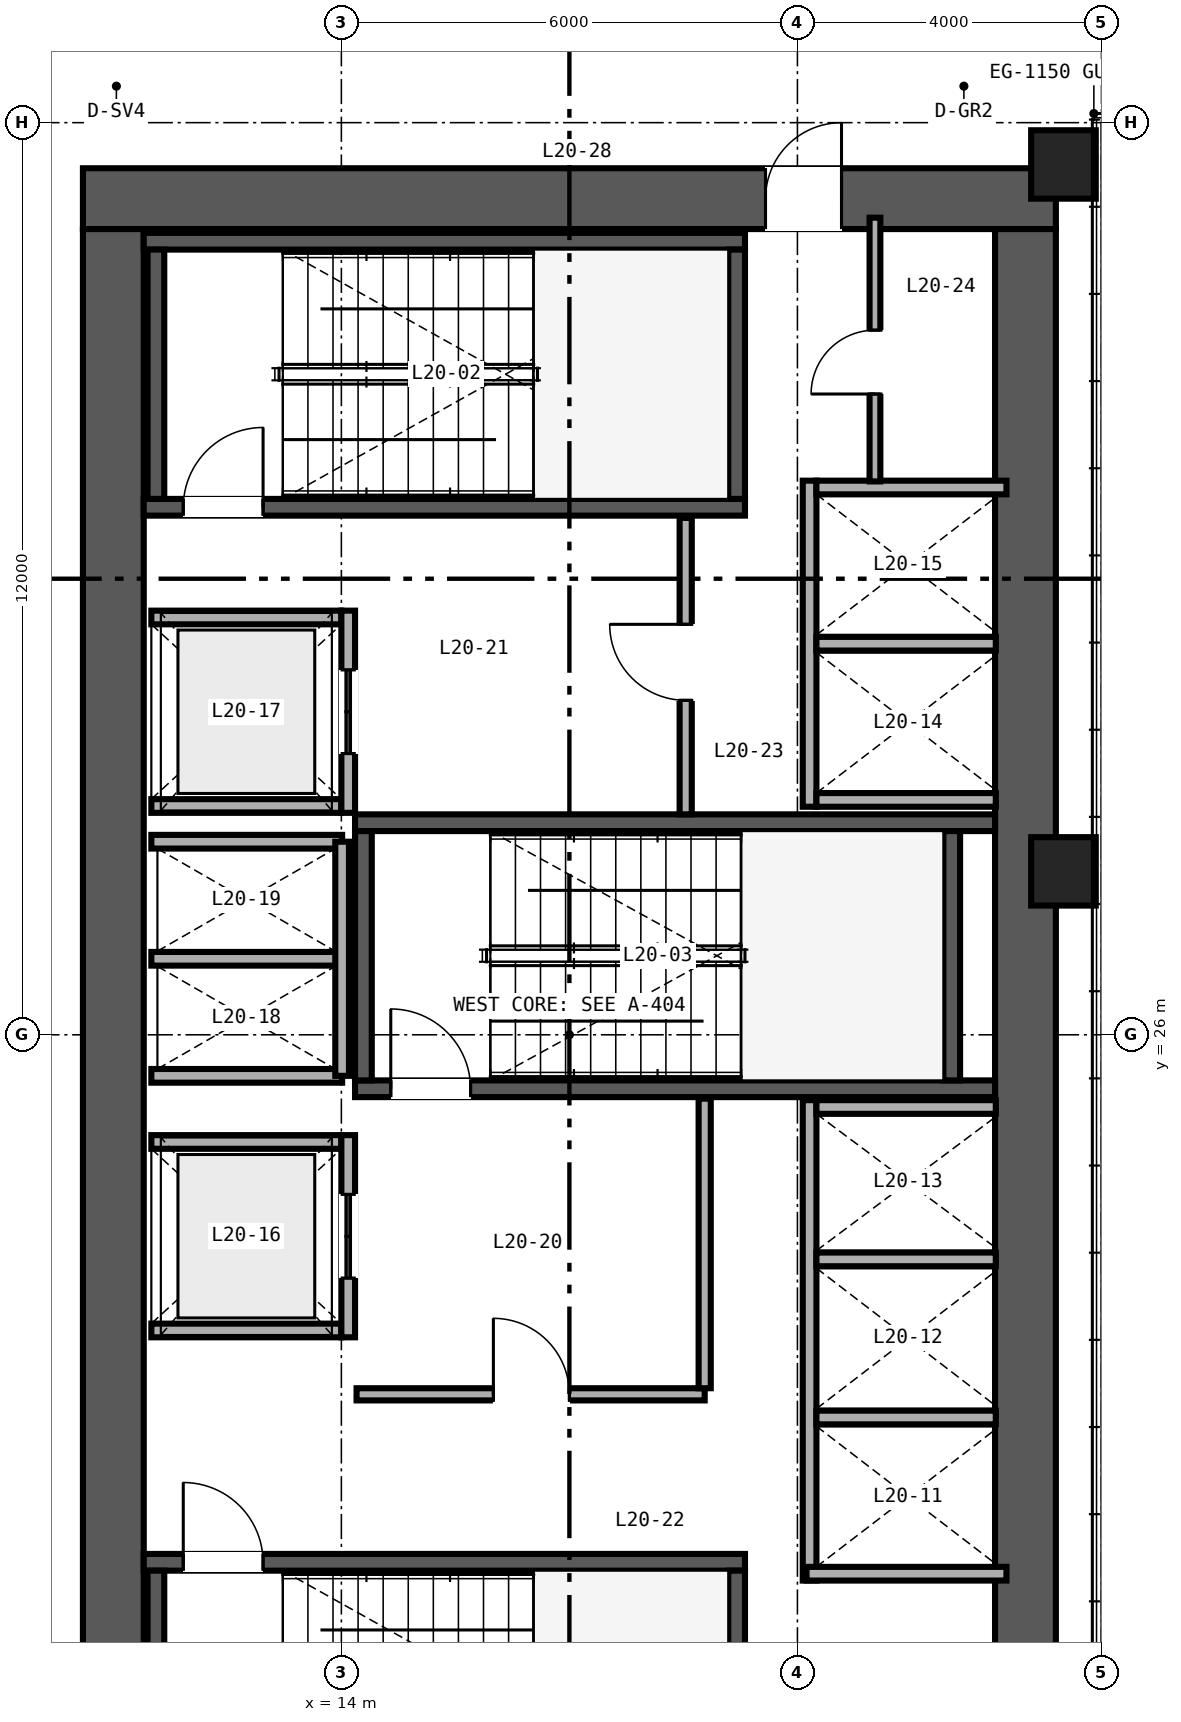
"""IFC4 building model, lengths in metres.
Left out: names, types, materials, properties, quantities, classifications, styles, units other than length and angle.
Written with IfcOpenShell. Run it as: python <this file> out.ifc"""

import sys

from ifc_helpers import new_model, si_unit, direction, frame, frame_2d, origin, origin_2d, place, context, subcontext, project, spatial, rectangle, hollow_rectangle, extrude, source, transform, mapped, element, fill, save


model = new_model("IFC4")
c1 = context("Model", 3, precision=1e-05, world=origin(), true_north=direction((0.0, 1.0)))
c2 = subcontext(c1, "Body", "Model", "MODEL_VIEW")
j1 = project(units=[si_unit("LENGTHUNIT", "METRE"), si_unit("PLANEANGLEUNIT", "RADIAN")], contexts=[c1])
p1 = place(None, origin())
s1 = spatial("IfcSite", under=j1, at=p1, CompositionType="ELEMENT")
p2 = place(p1, origin())
s2 = spatial("IfcBuilding", under=s1, at=p2, CompositionType="ELEMENT")
p3 = place(p2, frame((0.0, 0.0, 81.6)))
s3 = spatial("IfcBuildingStorey", under=s2, at=p3, CompositionType="ELEMENT", Elevation=81.6)
p4 = place(p3, frame((10.6, 37.0, 0.0), z_axis=(0.0, 0.0, 1.0), x_axis=(1.0, 0.0, 0.0)))
e1 = element("IfcWall", 1, at=p4, inside=s3, PredefinedType="SHEAR", context=c2, shape_type="SweptSolid", body=[
    extrude(rectangle(XDim=12.8, YDim=0.8, at=frame_2d((6.4, 0.0))), origin(), (0.0, 0.0, 1.0), 3.28),
])
p5 = place(p4, frame((8.98, 0.0, 0.0)))
e2 = element("IfcOpeningElement", 2, at=p5, cuts=e1, PredefinedType="OPENING", context=c2, shape_type="SweptSolid", body=[
    extrude(rectangle(XDim=1.0, YDim=2.15, at=frame_2d((0.5, 1.075))), frame((0.0, 0.41, 0.0), z_axis=(0.0, -1.0, 0.0), x_axis=(1.0, 0.0, 0.0)), (0.0, 0.0, 1.0), 0.82),
])
for number, where, z_axis, x_axis in (
    (3, (11.0, 15.4, 0.0), (0.0, 0.0, 1.0), (0.0, 1.0, 0.0)),
    (4, (23.0, 15.4, 0.0), (0.0, 0.0, 1.0), (0.0, 1.0, 0.0)),
):
    element("IfcWall", number, at=place(p3, frame(where, z_axis=z_axis, x_axis=x_axis)), inside=s3, PredefinedType="SHEAR", context=c2, shape_type="SweptSolid", body=[
        extrude(rectangle(XDim=21.2, YDim=0.8, at=frame_2d((10.6, 0.0))), origin(), (0.0, 0.0, 1.0), 3.28),
    ])
p6 = place(p3, frame((11.4, 19.06, 0.0), z_axis=(0.0, 0.0, 1.0), x_axis=(1.0, 0.0, 0.0)))
e5 = element("IfcWall", 5, at=p6, inside=s3, PredefinedType="SHEAR", context=c2, shape_type="SweptSolid", body=[
    extrude(rectangle(XDim=7.91, YDim=0.22, at=frame_2d((3.955, 0.0))), origin(), (0.0, 0.0, 1.0), 3.4),
])
p7 = place(p6, frame((0.52, 0.0, 0.0)))
e6 = element("IfcOpeningElement", 6, at=p7, cuts=e5, PredefinedType="OPENING", context=c2, shape_type="SweptSolid", body=[
    extrude(rectangle(XDim=1.05, YDim=2.15, at=frame_2d((0.525, 1.075))), frame((0.0, 0.12, 0.0), z_axis=(0.0, -1.0, 0.0), x_axis=(1.0, 0.0, 0.0)), (0.0, 0.0, 1.0), 0.24),
])
for number, where, z_axis, x_axis in (
    (7, (11.56, 15.67, 0.0), (0.0, 0.0, 1.0), (0.0, 1.0, 0.0)),
    (8, (19.2, 15.67, 0.0), (0.0, 0.0, 1.0), (0.0, 1.0, 0.0)),
):
    element("IfcWall", number, at=place(p3, frame(where, z_axis=z_axis, x_axis=x_axis)), inside=s3, PredefinedType="SHEAR", context=c2, shape_type="SweptSolid", body=[
        extrude(rectangle(XDim=3.28, YDim=0.22, at=frame_2d((1.64, 0.0))), origin(), (0.0, 0.0, 1.0), 3.4),
    ])
p8 = place(p3, frame((11.4, 32.94, 0.0), z_axis=(0.0, 0.0, 1.0), x_axis=(1.0, 0.0, 0.0)))
e9 = element("IfcWall", 9, at=p8, inside=s3, PredefinedType="SHEAR", context=c2, shape_type="SweptSolid", body=[
    extrude(rectangle(XDim=7.91, YDim=0.22, at=frame_2d((3.955, 0.0))), origin(), (0.0, 0.0, 1.0), 3.4),
])
p9 = place(p8, frame((0.52, 0.0, 0.0)))
e10 = element("IfcOpeningElement", 10, at=p9, cuts=e9, PredefinedType="OPENING", context=c2, shape_type="SweptSolid", body=[
    extrude(rectangle(XDim=1.05, YDim=2.15, at=frame_2d((0.525, 1.075))), frame((0.0, 0.12, 0.0), z_axis=(0.0, -1.0, 0.0), x_axis=(1.0, 0.0, 0.0)), (0.0, 0.0, 1.0), 0.24),
])
p10 = place(p3, frame((11.4, 36.44, 0.0), z_axis=(0.0, 0.0, 1.0), x_axis=(1.0, 0.0, 0.0)))
e11 = element("IfcWall", 11, at=p10, inside=s3, PredefinedType="SHEAR", context=c2, shape_type="SweptSolid", body=[
    extrude(rectangle(XDim=7.91, YDim=0.22, at=frame_2d((3.955, 0.0))), origin(), (0.0, 0.0, 1.0), 3.4),
])
for number, where, z_axis, x_axis in (
    (12, (11.56, 33.05, 0.0), (0.0, 0.0, 1.0), (0.0, 1.0, 0.0)),
    (13, (19.2, 33.05, 0.0), (0.0, 0.0, 1.0), (0.0, 1.0, 0.0)),
):
    element("IfcWall", number, at=place(p3, frame(where, z_axis=z_axis, x_axis=x_axis)), inside=s3, PredefinedType="SHEAR", context=c2, shape_type="SweptSolid", body=[
        extrude(rectangle(XDim=3.28, YDim=0.22, at=frame_2d((1.64, 0.0))), origin(), (0.0, 0.0, 1.0), 3.4),
    ])
p11 = place(p3, frame((14.18, 25.29, 0.0), z_axis=(0.0, 0.0, 1.0), x_axis=(1.0, 0.0, 0.0)))
e14 = element("IfcWall", 14, at=p11, inside=s3, PredefinedType="SHEAR", context=c2, shape_type="SweptSolid", body=[
    extrude(rectangle(XDim=8.42, YDim=0.22, at=frame_2d((4.21, 0.0))), origin(), (0.0, 0.0, 1.0), 3.4),
])
p12 = place(p11, frame((0.47, 0.0, 0.0)))
e15 = element("IfcOpeningElement", 15, at=p12, cuts=e14, PredefinedType="OPENING", context=c2, shape_type="SweptSolid", body=[
    extrude(rectangle(XDim=1.05, YDim=2.15, at=frame_2d((0.525, 1.075))), frame((0.0, 0.12, 0.0), z_axis=(0.0, -1.0, 0.0), x_axis=(1.0, 0.0, 0.0)), (0.0, 0.0, 1.0), 0.24),
])
p13 = place(p3, frame((14.18, 28.79, 0.0), z_axis=(0.0, 0.0, 1.0), x_axis=(1.0, 0.0, 0.0)))
e16 = element("IfcWall", 16, at=p13, inside=s3, PredefinedType="SHEAR", context=c2, shape_type="SweptSolid", body=[
    extrude(rectangle(XDim=8.42, YDim=0.22, at=frame_2d((4.21, 0.0))), origin(), (0.0, 0.0, 1.0), 3.4),
])
for number, where, z_axis, x_axis in (
    (17, (14.29, 25.4, 0.0), (0.0, 0.0, 1.0), (0.0, 1.0, 0.0)),
    (18, (22.03, 25.4, 0.0), (0.0, 0.0, 1.0), (0.0, 1.0, 0.0)),
):
    element("IfcWall", number, at=place(p3, frame(where, z_axis=z_axis, x_axis=x_axis)), inside=s3, PredefinedType="SHEAR", context=c2, shape_type="SweptSolid", body=[
        extrude(rectangle(XDim=3.28, YDim=0.22, at=frame_2d((1.64, 0.0))), origin(), (0.0, 0.0, 1.0), 3.4),
    ])
m1 = source(origin(), c2, "Body", "SweptSolid", [
    extrude(hollow_rectangle(XDim=0.85, YDim=0.9, WallThickness=0.04, at=origin_2d()), origin(), (0.0, 0.0, 1.0), 3.28),
])
for number, where, z_axis, x_axis in (
    (19, (23.5, 28.15, 0.0), (0.0, 0.0, 1.0), (1.0, 0.0, 0.0)),
    (20, (23.5, 37.45, 0.0), (0.0, 0.0, 1.0), (1.0, 0.0, 0.0)),
):
    element("IfcColumn", number, at=place(p3, frame(where, z_axis=z_axis, x_axis=x_axis)), inside=s3, PredefinedType="COLUMN", context=c2, shape_type="MappedRepresentation", body=[
        mapped(m1, transform((0.0, 0.0, 0.0), scale=1.0)),
    ])
p14 = place(p3, frame((20.16, 18.82, 0.0), z_axis=(0.0, 0.0, 1.0), x_axis=(0.0, 1.0, 0.0)))
e21 = element("IfcWall", 21, at=p14, inside=s3, PredefinedType="SOLIDWALL", context=c2, shape_type="SweptSolid", body=[
    extrude(rectangle(XDim=6.32, YDim=0.18, at=frame_2d((3.16, 0.0))), origin(), (0.0, 0.0, 1.0), 2.36),
])
p15 = place(p3, frame((20.12, 18.91, 0.0), z_axis=(0.0, 0.0, 1.0), x_axis=(1.0, 0.0, 0.0)))
e22 = element("IfcWall", 22, at=p15, inside=s3, PredefinedType="SOLIDWALL", context=c2, shape_type="SweptSolid", body=[
    extrude(rectangle(XDim=2.63, YDim=0.18, at=frame_2d((1.315, 0.0))), origin(), (0.0, 0.0, 1.0), 3.28),
])
p16 = place(p3, frame((20.25, 25.05, 0.0), z_axis=(0.0, 0.0, 1.0), x_axis=(1.0, 0.0, 0.0)))
e23 = element("IfcWall", 23, at=p16, inside=s3, PredefinedType="SOLIDWALL", context=c2, shape_type="SweptSolid", body=[
    extrude(rectangle(XDim=2.36, YDim=0.18, at=frame_2d((1.18, 0.0))), origin(), (0.0, 0.0, 1.0), 3.28),
])
p17 = place(p3, frame((20.25, 20.965, 0.0), z_axis=(0.0, 0.0, 1.0), x_axis=(1.0, 0.0, 0.0)))
e24 = element("IfcWall", 24, at=p17, inside=s3, PredefinedType="SOLIDWALL", context=c2, shape_type="SweptSolid", body=[
    extrude(rectangle(XDim=2.36, YDim=0.18, at=frame_2d((1.18, 0.0))), origin(), (0.0, 0.0, 1.0), 2.36),
])
p18 = place(p3, frame((20.25, 23.045, 0.0), z_axis=(0.0, 0.0, 1.0), x_axis=(1.0, 0.0, 0.0)))
e25 = element("IfcWall", 25, at=p18, inside=s3, PredefinedType="SOLIDWALL", context=c2, shape_type="SweptSolid", body=[
    extrude(rectangle(XDim=2.36, YDim=0.18, at=frame_2d((1.18, 0.0))), origin(), (0.0, 0.0, 1.0), 3.28),
])
p19 = place(p3, frame((20.16, 29.0, 0.0), z_axis=(0.0, 0.0, 1.0), x_axis=(0.0, 1.0, 0.0)))
e26 = element("IfcWall", 26, at=p19, inside=s3, PredefinedType="SOLIDWALL", context=c2, shape_type="SweptSolid", body=[
    extrude(rectangle(XDim=4.29, YDim=0.18, at=frame_2d((2.145, 0.0))), origin(), (0.0, 0.0, 1.0), 3.28),
])
p20 = place(p3, frame((20.25, 29.09, 0.0), z_axis=(0.0, 0.0, 1.0), x_axis=(1.0, 0.0, 0.0)))
e27 = element("IfcWall", 27, at=p20, inside=s3, PredefinedType="SOLIDWALL", context=c2, shape_type="SweptSolid", body=[
    extrude(rectangle(XDim=2.36, YDim=0.18, at=frame_2d((1.18, 0.0))), origin(), (0.0, 0.0, 1.0), 3.28),
])
p21 = place(p3, frame((20.25, 33.2, 0.0), z_axis=(0.0, 0.0, 1.0), x_axis=(1.0, 0.0, 0.0)))
e28 = element("IfcWall", 28, at=p21, inside=s3, PredefinedType="SOLIDWALL", context=c2, shape_type="SweptSolid", body=[
    extrude(rectangle(XDim=2.5, YDim=0.18, at=frame_2d((1.25, 0.0))), origin(), (0.0, 0.0, 1.0), 3.28),
])
p22 = place(p3, frame((20.25, 31.145, 0.0), z_axis=(0.0, 0.0, 1.0), x_axis=(1.0, 0.0, 0.0)))
e29 = element("IfcWall", 29, at=p22, inside=s3, PredefinedType="SOLIDWALL", context=c2, shape_type="SweptSolid", body=[
    extrude(rectangle(XDim=2.36, YDim=0.18, at=frame_2d((1.18, 0.0))), origin(), (0.0, 0.0, 1.0), 3.28),
])
for number, where, z_axis, x_axis in (
    (30, (11.5, 22.11, 0.0), (0.0, 0.0, 1.0), (1.0, 0.0, 0.0)),
    (31, (11.5, 24.59, 0.0), (0.0, 0.0, 1.0), (1.0, 0.0, 0.0)),
):
    element("IfcWall", number, at=place(p3, frame(where, z_axis=z_axis, x_axis=x_axis)), inside=s3, PredefinedType="SOLIDWALL", context=c2, shape_type="SweptSolid", body=[
        extrude(rectangle(XDim=2.5, YDim=0.18, at=frame_2d((1.25, 0.0))), origin(), (0.0, 0.0, 1.0), 3.28),
    ])
p23 = place(p3, frame((14.09, 22.02, 0.0), z_axis=(0.0, 0.0, 1.0), x_axis=(0.0, 1.0, 0.0)))
e32 = element("IfcWall", 32, at=p23, inside=s3, PredefinedType="SOLIDWALL", context=c2, shape_type="SweptSolid", body=[
    extrude(rectangle(XDim=2.66, YDim=0.18, at=frame_2d((1.33, 0.0))), origin(), (0.0, 0.0, 1.0), 3.28),
])
p24 = place(p23, frame((0.78, 0.0, 0.0)))
e33 = element("IfcOpeningElement", 33, at=p24, cuts=e32, PredefinedType="OPENING", context=c2, shape_type="SweptSolid", body=[
    extrude(rectangle(XDim=1.1, YDim=2.2, at=frame_2d((0.55, 1.1))), frame((0.0, 0.1, 0.0), z_axis=(0.0, -1.0, 0.0), x_axis=(1.0, 0.0, 0.0)), (0.0, 0.0, 1.0), 0.2),
])
for number, where, z_axis, x_axis in (
    (34, (11.5, 29.01, 0.0), (0.0, 0.0, 1.0), (1.0, 0.0, 0.0)),
    (35, (11.5, 31.49, 0.0), (0.0, 0.0, 1.0), (1.0, 0.0, 0.0)),
):
    element("IfcWall", number, at=place(p3, frame(where, z_axis=z_axis, x_axis=x_axis)), inside=s3, PredefinedType="SOLIDWALL", context=c2, shape_type="SweptSolid", body=[
        extrude(rectangle(XDim=2.5, YDim=0.18, at=frame_2d((1.25, 0.0))), origin(), (0.0, 0.0, 1.0), 3.28),
    ])
p25 = place(p3, frame((14.09, 28.92, 0.0), z_axis=(0.0, 0.0, 1.0), x_axis=(0.0, 1.0, 0.0)))
e36 = element("IfcWall", 36, at=p25, inside=s3, PredefinedType="SOLIDWALL", context=c2, shape_type="SweptSolid", body=[
    extrude(rectangle(XDim=2.66, YDim=0.18, at=frame_2d((1.33, 0.0))), origin(), (0.0, 0.0, 1.0), 3.28),
])
p26 = place(p25, frame((0.78, 0.0, 0.0)))
e37 = element("IfcOpeningElement", 37, at=p26, cuts=e36, PredefinedType="OPENING", context=c2, shape_type="SweptSolid", body=[
    extrude(rectangle(XDim=1.1, YDim=2.2, at=frame_2d((0.55, 1.1))), frame((0.0, 0.1, 0.0), z_axis=(0.0, -1.0, 0.0), x_axis=(1.0, 0.0, 0.0)), (0.0, 0.0, 1.0), 0.2),
])
for number, where, z_axis, x_axis in (
    (38, (11.5, 25.46, 0.0), (0.0, 0.0, 1.0), (1.0, 0.0, 0.0)),
    (39, (11.5, 27.0, 0.0), (0.0, 0.0, 1.0), (1.0, 0.0, 0.0)),
    (40, (11.5, 28.54, 0.0), (0.0, 0.0, 1.0), (1.0, 0.0, 0.0)),
):
    element("IfcWall", number, at=place(p3, frame(where, z_axis=z_axis, x_axis=x_axis)), inside=s3, PredefinedType="SOLIDWALL", context=c2, shape_type="SweptSolid", body=[
        extrude(rectangle(XDim=2.51, YDim=0.18, at=frame_2d((1.255, 0.0))), origin(), (0.0, 0.0, 1.0), 3.28),
    ])
p27 = place(p3, frame((14.01, 25.46, 0.0), z_axis=(0.0, 0.0, 1.0), x_axis=(0.0, 1.0, 0.0)))
e41 = element("IfcWall", 41, at=p27, inside=s3, PredefinedType="SOLIDWALL", context=c2, shape_type="SweptSolid", body=[
    extrude(rectangle(XDim=3.08, YDim=0.18, at=frame_2d((1.54, 0.0))), origin(), (0.0, 0.0, 1.0), 3.28),
])
p28 = place(p3, frame((14.2, 21.27, 0.0), z_axis=(0.0, 0.0, 1.0), x_axis=(1.0, 0.0, 0.0)))
e42 = element("IfcWall", 42, at=p28, inside=s3, PredefinedType="PARTITIONING", context=c2, shape_type="SweptSolid", body=[
    extrude(rectangle(XDim=4.58, YDim=0.16, at=frame_2d((2.29, 0.0))), origin(), (0.0, 0.0, 1.0), 3.28),
])
p29 = place(p28, frame((1.8, 0.0, 0.0)))
e43 = element("IfcOpeningElement", 43, at=p29, cuts=e42, PredefinedType="OPENING", context=c2, shape_type="SweptSolid", body=[
    extrude(rectangle(XDim=1.0, YDim=2.15, at=frame_2d((0.5, 1.075))), frame((0.0, 0.09, 0.0), z_axis=(0.0, -1.0, 0.0), x_axis=(1.0, 0.0, 0.0)), (0.0, 0.0, 1.0), 0.18),
])
p30 = place(p3, frame((18.78, 21.35, 0.0), z_axis=(0.0, 0.0, 1.0), x_axis=(0.0, 1.0, 0.0)))
e44 = element("IfcWall", 44, at=p30, inside=s3, PredefinedType="PARTITIONING", context=c2, shape_type="SweptSolid", body=[
    extrude(rectangle(XDim=3.81, YDim=0.16, at=frame_2d((1.905, 0.0))), origin(), (0.0, 0.0, 1.0), 3.28),
])
p31 = place(p3, frame((18.53, 28.9, 0.0), z_axis=(0.0, 0.0, 1.0), x_axis=(0.0, 1.0, 0.0)))
e45 = element("IfcWall", 45, at=p31, inside=s3, PredefinedType="PARTITIONING", context=c2, shape_type="SweptSolid", body=[
    extrude(rectangle(XDim=3.9, YDim=0.16, at=frame_2d((1.95, 0.0))), origin(), (0.0, 0.0, 1.0), 3.28),
])
p32 = place(p31, frame((1.5, 0.0, 0.0)))
e46 = element("IfcOpeningElement", 46, at=p32, cuts=e45, PredefinedType="OPENING", context=c2, shape_type="SweptSolid", body=[
    extrude(rectangle(XDim=1.0, YDim=2.15, at=frame_2d((0.5, 1.075))), frame((0.0, 0.09, 0.0), z_axis=(0.0, -1.0, 0.0), x_axis=(1.0, 0.0, 0.0)), (0.0, 0.0, 1.0), 0.18),
])
p33 = place(p3, frame((21.02, 33.28, 0.0), z_axis=(0.0, 0.0, 1.0), x_axis=(0.0, 1.0, 0.0)))
e47 = element("IfcWall", 47, at=p33, inside=s3, PredefinedType="PARTITIONING", context=c2, shape_type="SweptSolid", body=[
    extrude(rectangle(XDim=3.47, YDim=0.142, at=frame_2d((1.735, 0.0))), origin(), (0.0, 0.0, 1.0), 3.28),
])
p34 = place(p33, frame((1.15, 0.0, 0.0)))
e48 = element("IfcOpeningElement", 48, at=p34, cuts=e47, PredefinedType="OPENING", context=c2, shape_type="SweptSolid", body=[
    extrude(rectangle(XDim=0.84, YDim=2.1, at=frame_2d((0.42, 1.05))), frame((0.0, 0.081, 0.0), z_axis=(0.0, -1.0, 0.0), x_axis=(1.0, 0.0, 0.0)), (0.0, 0.0, 1.0), 0.162),
])
m2 = source(origin(), c2, "Body", "SweptSolid", [
    extrude(rectangle(XDim=1.05, YDim=2.15, at=frame_2d((0.525, 1.075))), frame((0.0, 0.025, 0.0), z_axis=(0.0, -1.0, 0.0), x_axis=(1.0, 0.0, 0.0)), (0.0, 0.0, 1.0), 0.05),
])
p35 = place(p7, origin())
e49 = element("IfcDoor", 49, at=p35, inside=s3, OperationType="SINGLE_SWING_LEFT", PredefinedType="DOOR", context=c2, shape_type="MappedRepresentation", body=[
    mapped(m2, transform((0.0, 0.0, 0.0), scale=1.0)),
])
fill(e6, e49)
p36 = place(p9, origin())
e50 = element("IfcDoor", 50, at=p36, inside=s3, OperationType="SINGLE_SWING_RIGHT", PredefinedType="DOOR", context=c2, shape_type="MappedRepresentation", body=[
    mapped(m2, transform((0.0, 0.0, 0.0), scale=1.0)),
])
fill(e10, e50)
p37 = place(p12, origin())
e51 = element("IfcDoor", 51, at=p37, inside=s3, OperationType="SINGLE_SWING_LEFT", PredefinedType="DOOR", context=c2, shape_type="MappedRepresentation", body=[
    mapped(m2, transform((0.0, 0.0, 0.0), scale=1.0)),
])
fill(e15, e51)
m3 = source(origin(), c2, "Body", "SweptSolid", [
    extrude(rectangle(XDim=1.1, YDim=2.2, at=frame_2d((0.55, 1.1))), frame((0.0, 0.025, 0.0), z_axis=(0.0, -1.0, 0.0), x_axis=(1.0, 0.0, 0.0)), (0.0, 0.0, 1.0), 0.05),
])
p38 = place(p24, origin())
e52 = element("IfcDoor", 52, at=p38, inside=s3, OperationType="DOUBLE_DOOR_SLIDING", PredefinedType="DOOR", context=c2, shape_type="MappedRepresentation", body=[
    mapped(m3, transform((0.0, 0.0, 0.0), scale=1.0)),
])
fill(e33, e52)
p39 = place(p26, origin())
e53 = element("IfcDoor", 53, at=p39, inside=s3, OperationType="DOUBLE_DOOR_SLIDING", PredefinedType="DOOR", context=c2, shape_type="MappedRepresentation", body=[
    mapped(m3, transform((0.0, 0.0, 0.0), scale=1.0)),
])
fill(e37, e53)
m4 = source(origin(), c2, "Body", "SweptSolid", [
    extrude(rectangle(XDim=1.0, YDim=2.15, at=frame_2d((0.5, 1.075))), frame((0.0, 0.025, 0.0), z_axis=(0.0, -1.0, 0.0), x_axis=(1.0, 0.0, 0.0)), (0.0, 0.0, 1.0), 0.05),
])
p40 = place(p29, origin())
e54 = element("IfcDoor", 54, at=p40, inside=s3, OperationType="SINGLE_SWING_LEFT", PredefinedType="DOOR", context=c2, shape_type="MappedRepresentation", body=[
    mapped(m4, transform((0.0, 0.0, 0.0), scale=1.0)),
])
fill(e43, e54)
p41 = place(p32, origin())
e55 = element("IfcDoor", 55, at=p41, inside=s3, OperationType="SINGLE_SWING_RIGHT", PredefinedType="DOOR", context=c2, shape_type="MappedRepresentation", body=[
    mapped(m4, transform((0.0, 0.0, 0.0), scale=1.0)),
])
fill(e46, e55)
m5 = source(origin(), c2, "Body", "SweptSolid", [
    extrude(rectangle(XDim=0.84, YDim=2.1, at=frame_2d((0.42, 1.05))), frame((0.0, 0.025, 0.0), z_axis=(0.0, -1.0, 0.0), x_axis=(1.0, 0.0, 0.0)), (0.0, 0.0, 1.0), 0.05),
])
p42 = place(p34, origin())
e56 = element("IfcDoor", 56, at=p42, inside=s3, OperationType="SINGLE_SWING_LEFT", PredefinedType="DOOR", context=c2, shape_type="MappedRepresentation", body=[
    mapped(m5, transform((0.0, 0.0, 0.0), scale=1.0)),
])
fill(e48, e56)
p43 = place(p5, origin())
e57 = element("IfcDoor", 57, at=p43, inside=s3, OperationType="SINGLE_SWING_RIGHT", PredefinedType="DOOR", context=c2, shape_type="MappedRepresentation", body=[
    mapped(m4, transform((0.0, 0.0, 0.0), scale=1.0)),
])
fill(e2, e57)
save(model, sys.argv[1])
